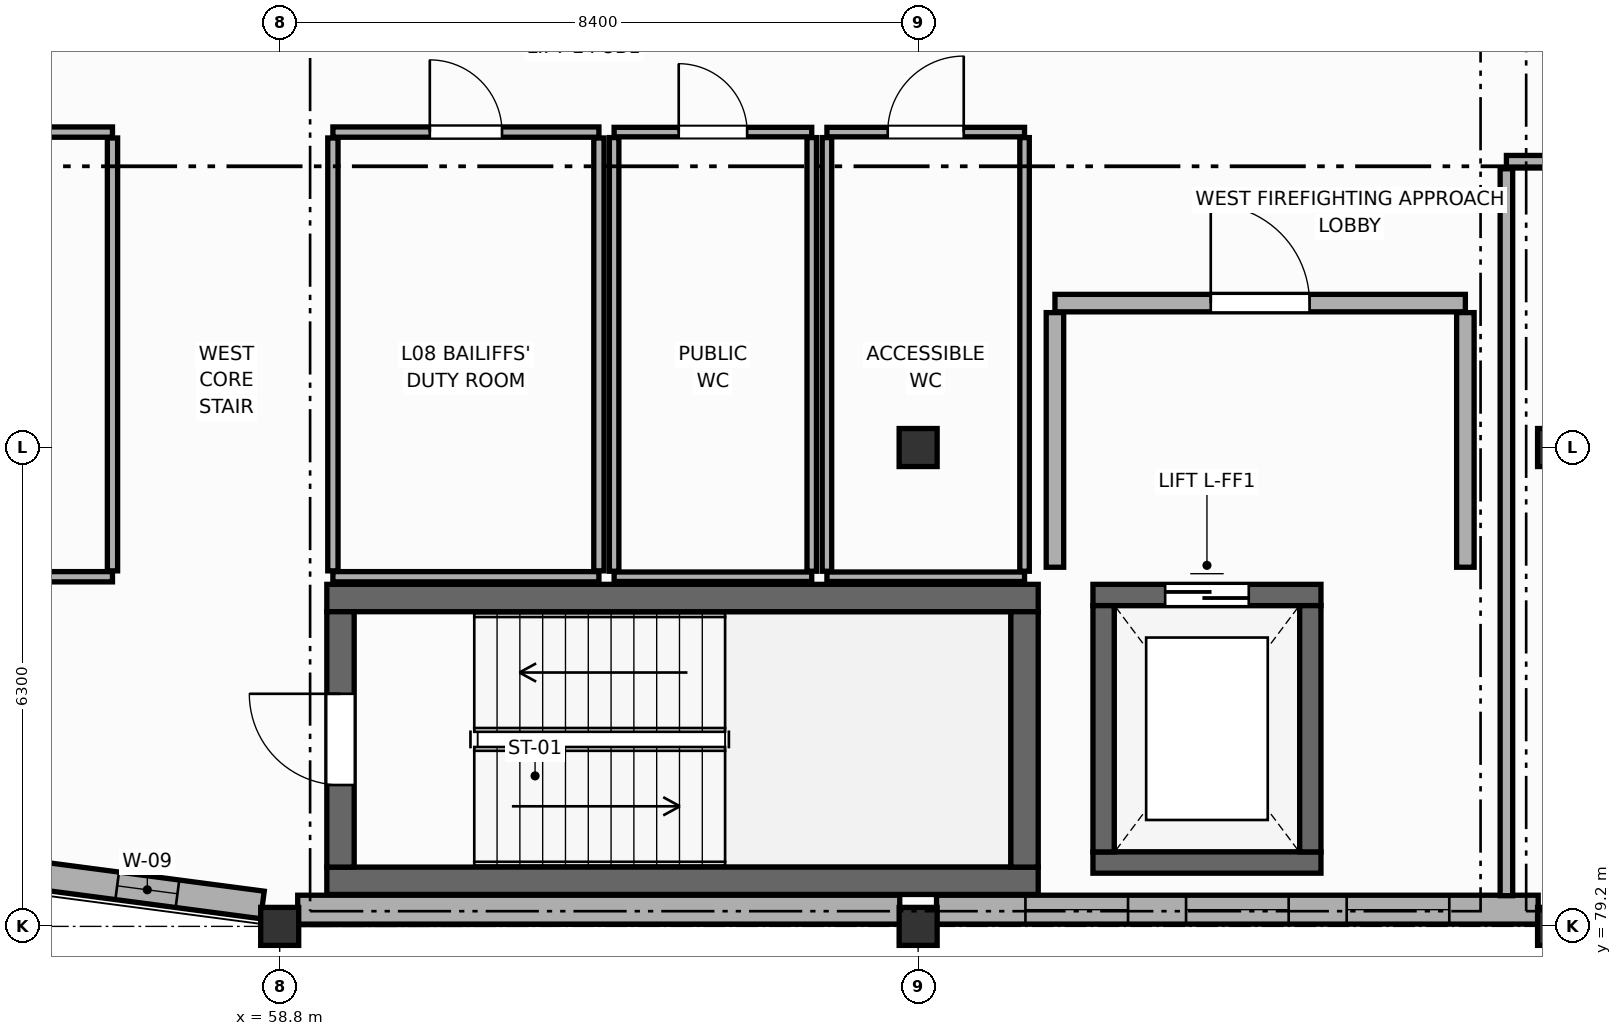
"""IFC4 building model, lengths in metres.
Left out: names, types, materials, properties, quantities, classifications, styles, units other than length and angle.
Written with IfcOpenShell. Run it as: python <this file> out.ifc"""

import sys

from ifc_helpers import new_model, si_unit, direction, frame, frame_2d, origin, origin_2d, place, context, subcontext, project, spatial, rectangle, extrude, element, fill, save


model = new_model("IFC4")
c1 = context("Model", 3, precision=1e-05, world=origin(), true_north=direction((0.0, 1.0)))
c2 = subcontext(c1, "Body", "Model", "MODEL_VIEW")
j1 = project(units=[si_unit("LENGTHUNIT", "METRE"), si_unit("PLANEANGLEUNIT", "RADIAN")], contexts=[c1])
p1 = place(None, origin())
s1 = spatial("IfcSite", under=j1, at=p1, CompositionType="ELEMENT")
p2 = place(p1, origin())
s2 = spatial("IfcBuilding", under=s1, at=p2, CompositionType="ELEMENT")
p3 = place(p2, frame((0.0, 0.0, 31.2)))
s3 = spatial("IfcBuildingStorey", under=s2, at=p3, CompositionType="ELEMENT", Elevation=31.2)
for number, where, z_axis, x_axis in (
    (1, (58.8, 79.2, 0.0), (0.0, 0.0, 1.0), (1.0, 0.0, 0.0)),
    (2, (67.2, 79.2, 0.0), (0.0, 0.0, 1.0), (1.0, 0.0, 0.0)),
    (3, (67.2, 85.5, 0.0), (0.0, 0.0, 1.0), (1.0, 0.0, 0.0)),
    (4, (75.6, 79.2, 0.0), (0.0, 0.0, 1.0), (1.0, 0.0, 0.0)),
    (5, (75.6, 85.5, 0.0), (0.0, 0.0, 1.0), (1.0, 0.0, 0.0)),
):
    element("IfcColumn", number, at=place(p3, frame(where, z_axis=z_axis, x_axis=x_axis)), inside=s3, PredefinedType="COLUMN", context=c2, shape_type="SweptSolid", body=[
        extrude(rectangle(XDim=0.5, YDim=0.5, at=origin_2d()), origin(), (0.0, 0.0, 1.0), 4.2),
    ])
p4 = place(p3, frame((66.958, 79.42, 0.0), z_axis=(0.0, 0.0, 1.0), x_axis=(-1.0, 0.0, 0.0)))
e6 = element("IfcWall", 6, at=p4, inside=s3, PredefinedType="STANDARD", context=c2, shape_type="SweptSolid", body=[
    extrude(rectangle(XDim=7.921, YDim=0.38, at=frame_2d((3.96, 0.0))), origin(), (0.0, 0.0, 1.0), 3.11),
])
p5 = place(p3, frame((75.358, 79.42, 0.0), z_axis=(0.0, 0.0, 1.0), x_axis=(-1.0, 0.0, 0.0)))
e7 = element("IfcWall", 7, at=p5, inside=s3, PredefinedType="STANDARD", context=c2, shape_type="SweptSolid", body=[
    extrude(rectangle(XDim=7.916, YDim=0.38, at=frame_2d((3.958, 0.0))), origin(), (0.0, 0.0, 1.0), 3.51),
])
p6 = place(p5, frame((1.17, 0.0, 0.85)))
e8 = element("IfcOpeningElement", 8, at=p6, cuts=e7, PredefinedType="OPENING", context=c2, shape_type="SweptSolid", body=[
    extrude(rectangle(XDim=1.35, YDim=1.95, at=frame_2d((0.675, 0.975))), frame((0.0, 0.2, 0.0), z_axis=(0.0, -1.0, 0.0), x_axis=(1.0, 0.0, 0.0)), (0.0, 0.0, 1.0), 0.4),
])
p7 = place(p5, frame((3.283, 0.0, 0.85)))
e9 = element("IfcOpeningElement", 9, at=p7, cuts=e7, PredefinedType="OPENING", context=c2, shape_type="SweptSolid", body=[
    extrude(rectangle(XDim=1.35, YDim=1.95, at=frame_2d((0.675, 0.975))), frame((0.0, 0.2, 0.0), z_axis=(0.0, -1.0, 0.0), x_axis=(1.0, 0.0, 0.0)), (0.0, 0.0, 1.0), 0.4),
])
p8 = place(p5, frame((5.396, 0.0, 0.85)))
e10 = element("IfcOpeningElement", 10, at=p8, cuts=e7, PredefinedType="OPENING", context=c2, shape_type="SweptSolid", body=[
    extrude(rectangle(XDim=1.35, YDim=1.95, at=frame_2d((0.675, 0.975))), frame((0.0, 0.2, 0.0), z_axis=(0.0, -1.0, 0.0), x_axis=(1.0, 0.0, 0.0)), (0.0, 0.0, 1.0), 0.4),
])
p9 = place(p3, frame((55.572, 79.877, 0.0), z_axis=(0.0, 0.0, 1.0), x_axis=(0.991438641413, -0.130573428817, 0.0)))
e11 = element("IfcWall", 11, at=p9, inside=s3, PredefinedType="ELEMENTEDWALL", context=c2, shape_type="SweptSolid", body=[
    extrude(rectangle(XDim=3.027, YDim=0.365, at=frame_2d((1.514, 0.0))), origin(), (0.0, 0.0, 1.0), 3.11),
])
p10 = place(p9, frame((1.1, 0.0, 0.85)))
e12 = element("IfcOpeningElement", 12, at=p10, cuts=e11, PredefinedType="OPENING", context=c2, shape_type="SweptSolid", body=[
    extrude(rectangle(XDim=0.8, YDim=1.7, at=frame_2d((0.4, 0.85))), frame((0.0, 0.192, 0.0), z_axis=(0.0, -1.0, 0.0), x_axis=(1.0, 0.0, 0.0)), (0.0, 0.0, 1.0), 0.385),
])
for number, where, z_axis, x_axis in (
    (13, (59.42, 83.52, 0.0), (0.0, 0.0, 1.0), (1.0, 0.0, 0.0)),
    (14, (68.78, 79.8, 0.0), (0.0, 0.0, 1.0), (-1.0, 0.0, 0.0)),
):
    element("IfcWall", number, at=place(p3, frame(where, z_axis=z_axis, x_axis=x_axis)), inside=s3, PredefinedType="SHEAR", context=c2, shape_type="SweptSolid", body=[
        extrude(rectangle(XDim=9.36, YDim=0.36, at=frame_2d((4.68, 0.0))), origin(), (0.0, 0.0, 1.0), 3.98),
    ])
p11 = place(p3, frame((59.6, 79.98, 0.0), z_axis=(0.0, 0.0, 1.0), x_axis=(0.0, 1.0, 0.0)))
e15 = element("IfcWall", 15, at=p11, inside=s3, PredefinedType="SHEAR", context=c2, shape_type="SweptSolid", body=[
    extrude(rectangle(XDim=3.36, YDim=0.36, at=frame_2d((1.68, 0.0))), origin(), (0.0, 0.0, 1.0), 3.98),
])
p12 = place(p11, frame((1.08, 0.0, 0.0)))
e16 = element("IfcOpeningElement", 16, at=p12, cuts=e15, PredefinedType="OPENING", context=c2, shape_type="SweptSolid", body=[
    extrude(rectangle(XDim=1.2, YDim=2.2, at=frame_2d((0.6, 1.1))), frame((0.0, 0.19, 0.0), z_axis=(0.0, -1.0, 0.0), x_axis=(1.0, 0.0, 0.0)), (0.0, 0.0, 1.0), 0.38),
])
p13 = place(p3, frame((68.6, 83.34, 0.0), z_axis=(0.0, 0.0, 1.0), x_axis=(0.0, -1.0, 0.0)))
e17 = element("IfcWall", 17, at=p13, inside=s3, PredefinedType="SHEAR", context=c2, shape_type="SweptSolid", body=[
    extrude(rectangle(XDim=3.36, YDim=0.36, at=frame_2d((1.68, 0.0))), origin(), (0.0, 0.0, 1.0), 3.98),
])
p14 = place(p3, frame((69.5, 83.56, 0.0), z_axis=(0.0, 0.0, 1.0), x_axis=(1.0, 0.0, 0.0)))
e18 = element("IfcWall", 18, at=p14, inside=s3, PredefinedType="SHEAR", context=c2, shape_type="SweptSolid", body=[
    extrude(rectangle(XDim=3.0, YDim=0.28, at=frame_2d((1.5, 0.0))), origin(), (0.0, 0.0, 1.0), 3.98),
])
p15 = place(p14, frame((0.95, 0.0, 0.0)))
e19 = element("IfcOpeningElement", 19, at=p15, cuts=e18, PredefinedType="OPENING", context=c2, shape_type="SweptSolid", body=[
    extrude(rectangle(XDim=1.1, YDim=2.2, at=frame_2d((0.55, 1.1))), frame((0.0, 0.15, 0.0), z_axis=(0.0, -1.0, 0.0), x_axis=(1.0, 0.0, 0.0)), (0.0, 0.0, 1.0), 0.3),
])
p16 = place(p3, frame((72.5, 80.04, 0.0), z_axis=(0.0, 0.0, 1.0), x_axis=(-1.0, 0.0, 0.0)))
e20 = element("IfcWall", 20, at=p16, inside=s3, PredefinedType="SHEAR", context=c2, shape_type="SweptSolid", body=[
    extrude(rectangle(XDim=3.0, YDim=0.28, at=frame_2d((1.5, 0.0))), origin(), (0.0, 0.0, 1.0), 3.98),
])
for number, where, z_axis, x_axis in (
    (21, (69.64, 80.18, 0.0), (0.0, 0.0, 1.0), (0.0, 1.0, 0.0)),
    (22, (72.36, 83.42, 0.0), (0.0, 0.0, 1.0), (0.0, -1.0, 0.0)),
):
    element("IfcWall", number, at=place(p3, frame(where, z_axis=z_axis, x_axis=x_axis)), inside=s3, PredefinedType="SHEAR", context=c2, shape_type="SweptSolid", body=[
        extrude(rectangle(XDim=3.24, YDim=0.28, at=frame_2d((1.62, 0.0))), origin(), (0.0, 0.0, 1.0), 3.98),
    ])
p17 = place(p3, frame((69.0, 87.4, 0.0), z_axis=(0.0, 0.0, 1.0), x_axis=(1.0, 0.0, 0.0)))
e23 = element("IfcWall", 23, at=p17, inside=s3, PredefinedType="STANDARD", context=c2, shape_type="SweptSolid", body=[
    extrude(rectangle(XDim=5.4, YDim=0.23, at=frame_2d((2.7, 0.0))), origin(), (0.0, 0.0, 1.0), 3.965),
])
p18 = place(p17, frame((2.05, 0.0, 0.0)))
e24 = element("IfcOpeningElement", 24, at=p18, cuts=e23, PredefinedType="OPENING", context=c2, shape_type="SweptSolid", body=[
    extrude(rectangle(XDim=1.3, YDim=2.2, at=frame_2d((0.65, 1.1))), frame((0.0, 0.125, 0.0), z_axis=(0.0, -1.0, 0.0), x_axis=(1.0, 0.0, 0.0)), (0.0, 0.0, 1.0), 0.25),
])
for number, where, z_axis, x_axis in (
    (25, (69.0, 83.925, 0.0), (0.0, 0.0, 1.0), (0.0, 1.0, 0.0)),
    (26, (74.4, 87.275, 0.0), (0.0, 0.0, 1.0), (0.0, -1.0, 0.0)),
):
    element("IfcWall", number, at=place(p3, frame(where, z_axis=z_axis, x_axis=x_axis)), inside=s3, PredefinedType="STANDARD", context=c2, shape_type="SweptSolid", body=[
        extrude(rectangle(XDim=3.35, YDim=0.23, at=frame_2d((1.675, 0.0))), origin(), (0.0, 0.0, 1.0), 3.41),
    ])
p19 = place(p3, frame((63.2, 89.65, 0.0), z_axis=(0.0, 0.0, 1.0), x_axis=(1.0, 0.0, 0.0)))
e27 = element("IfcWall", 27, at=p19, inside=s3, PredefinedType="PARTITIONING", context=c2, shape_type="SweptSolid", body=[
    extrude(rectangle(XDim=2.6, YDim=0.125, at=frame_2d((1.3, 0.0))), origin(), (0.0, 0.0, 1.0), 3.965),
])
p20 = place(p19, frame((0.85, 0.0, 0.0)))
e28 = element("IfcOpeningElement", 28, at=p20, cuts=e27, PredefinedType="OPENING", context=c2, shape_type="SweptSolid", body=[
    extrude(rectangle(XDim=0.9, YDim=2.1, at=frame_2d((0.45, 1.05))), frame((0.0, 0.073, 0.0), z_axis=(0.0, -1.0, 0.0), x_axis=(1.0, 0.0, 0.0)), (0.0, 0.0, 1.0), 0.145),
])
p21 = place(p3, frame((65.8, 83.8, 0.0), z_axis=(0.0, 0.0, 1.0), x_axis=(-1.0, 0.0, 0.0)))
e29 = element("IfcWall", 29, at=p21, inside=s3, PredefinedType="PARTITIONING", context=c2, shape_type="SweptSolid", body=[
    extrude(rectangle(XDim=2.6, YDim=0.125, at=frame_2d((1.3, 0.0))), origin(), (0.0, 0.0, 1.0), 3.965),
])
for number, where, z_axis, x_axis in (
    (30, (63.2, 83.873, 0.0), (0.0, 0.0, 1.0), (0.0, 1.0, 0.0)),
    (31, (65.8, 89.577, 0.0), (0.0, 0.0, 1.0), (0.0, -1.0, 0.0)),
):
    element("IfcWall", number, at=place(p3, frame(where, z_axis=z_axis, x_axis=x_axis)), inside=s3, PredefinedType="PARTITIONING", context=c2, shape_type="SweptSolid", body=[
        extrude(rectangle(XDim=5.705, YDim=0.125, at=frame_2d((2.853, 0.0))), origin(), (0.0, 0.0, 1.0), 3.965),
    ])
p22 = place(p3, frame((66.0, 89.65, 0.0), z_axis=(0.0, 0.0, 1.0), x_axis=(1.0, 0.0, 0.0)))
e32 = element("IfcWall", 32, at=p22, inside=s3, PredefinedType="PARTITIONING", context=c2, shape_type="SweptSolid", body=[
    extrude(rectangle(XDim=2.6, YDim=0.125, at=frame_2d((1.3, 0.0))), origin(), (0.0, 0.0, 1.0), 3.51),
])
p23 = place(p22, frame((0.8, 0.0, 0.0)))
e33 = element("IfcOpeningElement", 33, at=p23, cuts=e32, PredefinedType="OPENING", context=c2, shape_type="SweptSolid", body=[
    extrude(rectangle(XDim=1.0, YDim=2.1, at=frame_2d((0.5, 1.05))), frame((0.0, 0.073, 0.0), z_axis=(0.0, -1.0, 0.0), x_axis=(1.0, 0.0, 0.0)), (0.0, 0.0, 1.0), 0.145),
])
p24 = place(p3, frame((68.6, 83.8, 0.0), z_axis=(0.0, 0.0, 1.0), x_axis=(-1.0, 0.0, 0.0)))
e34 = element("IfcWall", 34, at=p24, inside=s3, PredefinedType="PARTITIONING", context=c2, shape_type="SweptSolid", body=[
    extrude(rectangle(XDim=2.6, YDim=0.125, at=frame_2d((1.3, 0.0))), origin(), (0.0, 0.0, 1.0), 3.51),
])
p25 = place(p3, frame((66.0, 83.873, 0.0), z_axis=(0.0, 0.0, 1.0), x_axis=(0.0, 1.0, 0.0)))
e35 = element("IfcWall", 35, at=p25, inside=s3, PredefinedType="PARTITIONING", context=c2, shape_type="SweptSolid", body=[
    extrude(rectangle(XDim=5.705, YDim=0.125, at=frame_2d((2.853, 0.0))), origin(), (0.0, 0.0, 1.0), 3.965),
])
p26 = place(p3, frame((68.6, 89.577, 0.0), z_axis=(0.0, 0.0, 1.0), x_axis=(0.0, -1.0, 0.0)))
e36 = element("IfcWall", 36, at=p26, inside=s3, PredefinedType="PARTITIONING", context=c2, shape_type="SweptSolid", body=[
    extrude(rectangle(XDim=5.705, YDim=0.125, at=frame_2d((2.853, 0.0))), origin(), (0.0, 0.0, 1.0), 3.41),
])
p27 = place(p3, frame((59.5, 89.65, 0.0), z_axis=(0.0, 0.0, 1.0), x_axis=(1.0, 0.0, 0.0)))
e37 = element("IfcWall", 37, at=p27, inside=s3, PredefinedType="PARTITIONING", context=c2, shape_type="SweptSolid", body=[
    extrude(rectangle(XDim=3.5, YDim=0.135, at=frame_2d((1.75, 0.0))), origin(), (0.0, 0.0, 1.0), 3.965),
])
p28 = place(p27, frame((1.275, 0.0, 0.0)))
e38 = element("IfcOpeningElement", 38, at=p28, cuts=e37, PredefinedType="OPENING", context=c2, shape_type="SweptSolid", body=[
    extrude(rectangle(XDim=0.95, YDim=2.15, at=frame_2d((0.475, 1.075))), frame((0.0, 0.077, 0.0), z_axis=(0.0, -1.0, 0.0), x_axis=(1.0, 0.0, 0.0)), (0.0, 0.0, 1.0), 0.155),
])
p29 = place(p3, frame((63.0, 83.8, 0.0), z_axis=(0.0, 0.0, 1.0), x_axis=(-1.0, 0.0, 0.0)))
e39 = element("IfcWall", 39, at=p29, inside=s3, PredefinedType="PARTITIONING", context=c2, shape_type="SweptSolid", body=[
    extrude(rectangle(XDim=3.5, YDim=0.135, at=frame_2d((1.75, 0.0))), origin(), (0.0, 0.0, 1.0), 3.965),
])
for number, where, z_axis, x_axis in (
    (40, (59.5, 83.877, 0.0), (0.0, 0.0, 1.0), (0.0, 1.0, 0.0)),
    (41, (63.0, 89.573, 0.0), (0.0, 0.0, 1.0), (0.0, -1.0, 0.0)),
):
    element("IfcWall", number, at=place(p3, frame(where, z_axis=z_axis, x_axis=x_axis)), inside=s3, PredefinedType="PARTITIONING", context=c2, shape_type="SweptSolid", body=[
        extrude(rectangle(XDim=5.695, YDim=0.135, at=frame_2d((2.848, 0.0))), origin(), (0.0, 0.0, 1.0), 3.965),
    ])
p30 = place(p3, frame((74.94, 89.26, 0.0), z_axis=(0.0, 0.0, 1.0), x_axis=(1.0, 0.0, 0.0)))
e42 = element("IfcWall", 42, at=p30, inside=s3, PredefinedType="PARTITIONING", context=c2, shape_type="SweptSolid", body=[
    extrude(rectangle(XDim=3.268, YDim=0.165, at=frame_2d((1.634, 0.0))), origin(), (0.0, 0.0, 1.0), 3.51),
])
p31 = place(p30, frame((1.144, 0.0, 0.0)))
e43 = element("IfcOpeningElement", 43, at=p31, cuts=e42, PredefinedType="OPENING", context=c2, shape_type="SweptSolid", body=[
    extrude(rectangle(XDim=0.98, YDim=2.2, at=frame_2d((0.49, 1.1))), frame((0.0, 0.093, 0.0), z_axis=(0.0, -1.0, 0.0), x_axis=(1.0, 0.0, 0.0)), (0.0, 0.0, 1.0), 0.185),
])
p32 = place(p3, frame((74.94, 79.604, 0.0), z_axis=(0.0, 0.0, 1.0), x_axis=(0.0, 1.0, 0.0)))
e44 = element("IfcWall", 44, at=p32, inside=s3, PredefinedType="PARTITIONING", context=c2, shape_type="SweptSolid", body=[
    extrude(rectangle(XDim=9.563, YDim=0.165, at=frame_2d((4.782, 0.0))), origin(), (0.0, 0.0, 1.0), 3.41),
])
p33 = place(p3, frame((49.3, 89.65, 0.0), z_axis=(0.0, 0.0, 1.0), x_axis=(1.0, 0.0, 0.0)))
e45 = element("IfcWall", 45, at=p33, inside=s3, PredefinedType="PARTITIONING", context=c2, shape_type="SweptSolid", body=[
    extrude(rectangle(XDim=7.3, YDim=0.135, at=frame_2d((3.65, 0.0))), origin(), (0.0, 0.0, 1.0), 3.01),
])
p34 = place(p33, frame((1.198, 0.0, 0.0)))
e46 = element("IfcOpeningElement", 46, at=p34, cuts=e45, PredefinedType="OPENING", context=c2, shape_type="SweptSolid", body=[
    extrude(rectangle(XDim=0.95, YDim=2.15, at=frame_2d((0.475, 1.075))), frame((0.0, 0.077, 0.0), z_axis=(0.0, -1.0, 0.0), x_axis=(1.0, 0.0, 0.0)), (0.0, 0.0, 1.0), 0.155),
])
p35 = place(p3, frame((56.6, 83.8, 0.0), z_axis=(0.0, 0.0, 1.0), x_axis=(-1.0, 0.0, 0.0)))
e47 = element("IfcWall", 47, at=p35, inside=s3, PredefinedType="PARTITIONING", context=c2, shape_type="SweptSolid", body=[
    extrude(rectangle(XDim=7.3, YDim=0.135, at=frame_2d((3.65, 0.0))), origin(), (0.0, 0.0, 1.0), 3.01),
])
p36 = place(p3, frame((56.6, 89.573, 0.0), z_axis=(0.0, 0.0, 1.0), x_axis=(0.0, -1.0, 0.0)))
e48 = element("IfcWall", 48, at=p36, inside=s3, PredefinedType="PARTITIONING", context=c2, shape_type="SweptSolid", body=[
    extrude(rectangle(XDim=5.695, YDim=0.135, at=frame_2d((2.848, 0.0))), origin(), (0.0, 0.0, 1.0), 3.965),
])
p37 = place(p6, origin())
e49 = element("IfcWindow", 49, at=p37, inside=s3, PartitioningType="SINGLE_PANEL", PredefinedType="WINDOW", context=c2, shape_type="SweptSolid", body=[
    extrude(rectangle(XDim=1.35, YDim=1.95, at=frame_2d((0.675, 0.975))), frame((0.0, 0.03, 0.0), z_axis=(0.0, -1.0, 0.0), x_axis=(1.0, 0.0, 0.0)), (0.0, 0.0, 1.0), 0.06),
])
fill(e8, e49)
p38 = place(p7, origin())
e50 = element("IfcWindow", 50, at=p38, inside=s3, PartitioningType="SINGLE_PANEL", PredefinedType="WINDOW", context=c2, shape_type="SweptSolid", body=[
    extrude(rectangle(XDim=1.35, YDim=1.95, at=frame_2d((0.675, 0.975))), frame((0.0, 0.03, 0.0), z_axis=(0.0, -1.0, 0.0), x_axis=(1.0, 0.0, 0.0)), (0.0, 0.0, 1.0), 0.06),
])
fill(e9, e50)
p39 = place(p8, origin())
e51 = element("IfcWindow", 51, at=p39, inside=s3, PartitioningType="SINGLE_PANEL", PredefinedType="WINDOW", context=c2, shape_type="SweptSolid", body=[
    extrude(rectangle(XDim=1.35, YDim=1.95, at=frame_2d((0.675, 0.975))), frame((0.0, 0.03, 0.0), z_axis=(0.0, -1.0, 0.0), x_axis=(1.0, 0.0, 0.0)), (0.0, 0.0, 1.0), 0.06),
])
fill(e10, e51)
p40 = place(p10, origin())
e52 = element("IfcWindow", 52, at=p40, inside=s3, PartitioningType="SINGLE_PANEL", PredefinedType="WINDOW", context=c2, shape_type="SweptSolid", body=[
    extrude(rectangle(XDim=0.8, YDim=1.7, at=frame_2d((0.4, 0.85))), frame((0.0, 0.03, 0.0), z_axis=(0.0, -1.0, 0.0), x_axis=(1.0, 0.0, 0.0)), (0.0, 0.0, 1.0), 0.06),
])
fill(e12, e52)
p41 = place(p12, origin())
e53 = element("IfcDoor", 53, at=p41, inside=s3, OperationType="SINGLE_SWING_RIGHT", PredefinedType="DOOR", context=c2, shape_type="SweptSolid", body=[
    extrude(rectangle(XDim=1.2, YDim=2.2, at=frame_2d((0.6, 1.1))), frame((0.0, 0.025, 0.0), z_axis=(0.0, -1.0, 0.0), x_axis=(1.0, 0.0, 0.0)), (0.0, 0.0, 1.0), 0.05),
])
fill(e16, e53)
p42 = place(p15, origin())
e54 = element("IfcDoor", 54, at=p42, inside=s3, OperationType="DOUBLE_DOOR_SLIDING", PredefinedType="DOOR", context=c2, shape_type="SweptSolid", body=[
    extrude(rectangle(XDim=1.1, YDim=2.2, at=frame_2d((0.55, 1.1))), frame((0.0, 0.025, 0.0), z_axis=(0.0, -1.0, 0.0), x_axis=(1.0, 0.0, 0.0)), (0.0, 0.0, 1.0), 0.05),
])
fill(e19, e54)
p43 = place(p18, origin())
e55 = element("IfcDoor", 55, at=p43, inside=s3, OperationType="SINGLE_SWING_LEFT", PredefinedType="DOOR", context=c2, shape_type="SweptSolid", body=[
    extrude(rectangle(XDim=1.3, YDim=2.2, at=frame_2d((0.65, 1.1))), frame((0.0, 0.025, 0.0), z_axis=(0.0, -1.0, 0.0), x_axis=(1.0, 0.0, 0.0)), (0.0, 0.0, 1.0), 0.05),
])
fill(e24, e55)
p44 = place(p20, origin())
e56 = element("IfcDoor", 56, at=p44, inside=s3, OperationType="SINGLE_SWING_LEFT", PredefinedType="DOOR", context=c2, shape_type="SweptSolid", body=[
    extrude(rectangle(XDim=0.9, YDim=2.1, at=frame_2d((0.45, 1.05))), frame((0.0, 0.025, 0.0), z_axis=(0.0, -1.0, 0.0), x_axis=(1.0, 0.0, 0.0)), (0.0, 0.0, 1.0), 0.05),
])
fill(e28, e56)
p45 = place(p23, origin())
e57 = element("IfcDoor", 57, at=p45, inside=s3, OperationType="SINGLE_SWING_RIGHT", PredefinedType="DOOR", context=c2, shape_type="SweptSolid", body=[
    extrude(rectangle(XDim=1.0, YDim=2.1, at=frame_2d((0.5, 1.05))), frame((0.0, 0.025, 0.0), z_axis=(0.0, -1.0, 0.0), x_axis=(1.0, 0.0, 0.0)), (0.0, 0.0, 1.0), 0.05),
])
fill(e33, e57)
p46 = place(p28, origin())
e58 = element("IfcDoor", 58, at=p46, inside=s3, OperationType="SINGLE_SWING_LEFT", PredefinedType="DOOR", context=c2, shape_type="SweptSolid", body=[
    extrude(rectangle(XDim=0.95, YDim=2.15, at=frame_2d((0.475, 1.075))), frame((0.0, 0.025, 0.0), z_axis=(0.0, -1.0, 0.0), x_axis=(1.0, 0.0, 0.0)), (0.0, 0.0, 1.0), 0.05),
])
fill(e38, e58)
save(model, sys.argv[1])
